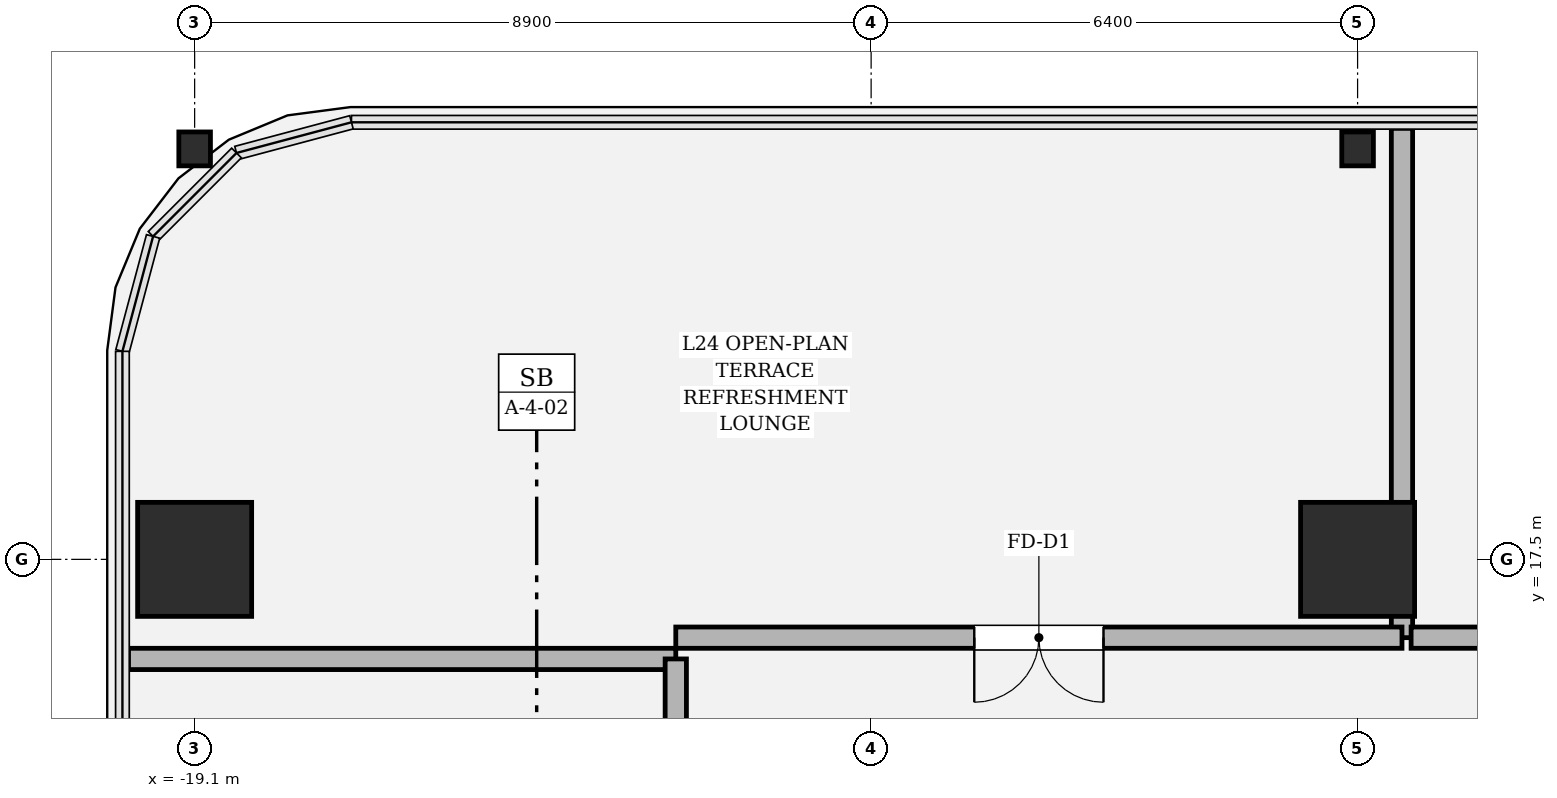
"""IFC4 building model, lengths in metres.
Left out: names, types, materials, properties, quantities, classifications, styles, units other than length and angle.
Written with IfcOpenShell. Run it as: python <this file> out.ifc"""

import sys

from ifc_helpers import new_model, si_unit, direction, frame, frame_2d, origin, origin_2d, place, context, subcontext, project, spatial, rectangle, hollow_rectangle, i_section, extrude, element, fill, save


model = new_model("IFC4")
c1 = context("Model", 3, precision=1e-05, world=origin(), true_north=direction((0.0, 1.0)))
c2 = subcontext(c1, "Body", "Model", "MODEL_VIEW")
j1 = project(units=[si_unit("LENGTHUNIT", "METRE"), si_unit("PLANEANGLEUNIT", "RADIAN")], contexts=[c1])
p1 = place(None, origin())
s1 = spatial("IfcSite", under=j1, at=p1, CompositionType="ELEMENT")
p2 = place(p1, origin())
s2 = spatial("IfcBuilding", under=s1, at=p2, CompositionType="ELEMENT")
p3 = place(p2, frame((0.0, 0.0, 105.15)))
s3 = spatial("IfcBuildingStorey", under=s2, at=p3, CompositionType="ELEMENT", Elevation=105.15)
for number, where, z_axis, x_axis in (
    (1, (-3.8, 17.5, 0.0), (0.0, 0.0, 1.0), (1.0, 0.0, 0.0)),
    (2, (-19.1, 17.5, 0.0), (0.0, 0.0, 1.0), (1.0, 0.0, 0.0)),
):
    element("IfcColumn", number, at=place(p3, frame(where, z_axis=z_axis, x_axis=x_axis)), inside=s3, PredefinedType="COLUMN", context=c2, shape_type="SweptSolid", body=[
        extrude(hollow_rectangle(XDim=1.5, YDim=1.5, WallThickness=0.045, at=origin_2d()), origin(), (0.0, 0.0, 1.0), 4.05),
    ])
for number, where, z_axis, x_axis in (
    (3, (-19.1, 22.9, 0.0), (0.0, 0.0, 1.0), (1.0, 0.0, 0.0)),
    (4, (-3.8, 22.9, 0.0), (0.0, 0.0, 1.0), (1.0, 0.0, 0.0)),
):
    element("IfcColumn", number, at=place(p3, frame(where, z_axis=z_axis, x_axis=x_axis)), inside=s3, PredefinedType="COLUMN", context=c2, shape_type="SweptSolid", body=[
        extrude(i_section(OverallWidth=0.416, OverallDepth=0.446, WebThickness=0.039, FlangeThickness=0.062, FilletRadius=0.018, at=origin_2d()), origin(), (0.0, 0.0, 1.0), 4.048),
    ])
p4 = place(p3, frame((-19.97, 16.19, 0.0), z_axis=(0.0, 0.0, 1.0), x_axis=(1.0, 0.0, 0.0)))
e5 = element("IfcWall", 5, at=p4, inside=s3, PredefinedType="SOLIDWALL", context=c2, shape_type="SweptSolid", body=[
    extrude(rectangle(XDim=7.2, YDim=0.28, at=frame_2d((3.6, 0.0))), origin(), (0.0, 0.0, 1.0), 2.484),
])
p5 = place(p3, frame((-12.77, 16.19, 0.0), z_axis=(0.0, 0.0, 1.0), x_axis=(0.0, -1.0, 0.0)))
e6 = element("IfcWall", 6, at=p5, inside=s3, PredefinedType="SOLIDWALL", context=c2, shape_type="SweptSolid", body=[
    extrude(rectangle(XDim=2.01, YDim=0.28, at=frame_2d((1.005, 0.0))), origin(), (0.0, 0.0, 1.0), 3.81),
])
p6 = place(p3, frame((-3.216, 23.17, 0.0), z_axis=(0.0, 0.0, 1.0), x_axis=(0.0, -1.0, 0.0)))
e7 = element("IfcWall", 7, at=p6, inside=s3, PredefinedType="SOLIDWALL", context=c2, shape_type="SweptSolid", body=[
    extrude(rectangle(XDim=6.7, YDim=0.28, at=frame_2d((3.35, 0.0))), origin(), (0.0, 0.0, 1.0), 2.484),
])
p7 = place(p3, frame((-3.216, 16.47, 0.0), z_axis=(0.0, 0.0, 1.0), x_axis=(-1.0, 0.0, 0.0)))
e8 = element("IfcWall", 8, at=p7, inside=s3, PredefinedType="SOLIDWALL", context=c2, shape_type="SweptSolid", body=[
    extrude(rectangle(XDim=9.554, YDim=0.28, at=frame_2d((4.777, 0.0))), origin(), (0.0, 0.0, 1.0), 2.484),
])
p8 = place(p7, frame((3.927, 0.0, 0.0)))
e9 = element("IfcOpeningElement", 9, at=p8, cuts=e8, PredefinedType="OPENING", context=c2, shape_type="SweptSolid", body=[
    extrude(rectangle(XDim=1.7, YDim=2.3, at=frame_2d((0.85, 1.15))), frame((0.0, 0.15, 0.0), z_axis=(0.0, -1.0, 0.0), x_axis=(1.0, 0.0, 0.0)), (0.0, 0.0, 1.0), 0.3),
])
p9 = place(p3, frame((15.57, 16.47, 0.0), z_axis=(0.0, 0.0, 1.0), x_axis=(-1.0, 0.0, 0.0)))
e10 = element("IfcWall", 10, at=p9, inside=s3, PredefinedType="SOLIDWALL", context=c2, shape_type="SweptSolid", body=[
    extrude(rectangle(XDim=18.666, YDim=0.28, at=frame_2d((9.333, 0.0))), origin(), (0.0, 0.0, 1.0), 2.484),
])
p10 = place(p9, frame((8.483, 0.0, 0.0)))
e11 = element("IfcOpeningElement", 11, at=p10, cuts=e10, PredefinedType="OPENING", context=c2, shape_type="SweptSolid", body=[
    extrude(rectangle(XDim=1.7, YDim=2.3, at=frame_2d((0.85, 1.15))), frame((0.0, 0.15, 0.0), z_axis=(0.0, -1.0, 0.0), x_axis=(1.0, 0.0, 0.0)), (0.0, 0.0, 1.0), 0.3),
])
p11 = place(p8, origin())
e12 = element("IfcDoor", 12, at=p11, inside=s3, OperationType="DOUBLE_DOOR_SINGLE_SWING", PredefinedType="DOOR", context=c2, shape_type="SweptSolid", body=[
    extrude(rectangle(XDim=1.7, YDim=2.3, at=frame_2d((0.85, 1.15))), frame((0.0, 0.025, 0.0), z_axis=(0.0, -1.0, 0.0), x_axis=(1.0, 0.0, 0.0)), (0.0, 0.0, 1.0), 0.05),
])
fill(e9, e12)
save(model, sys.argv[1])
